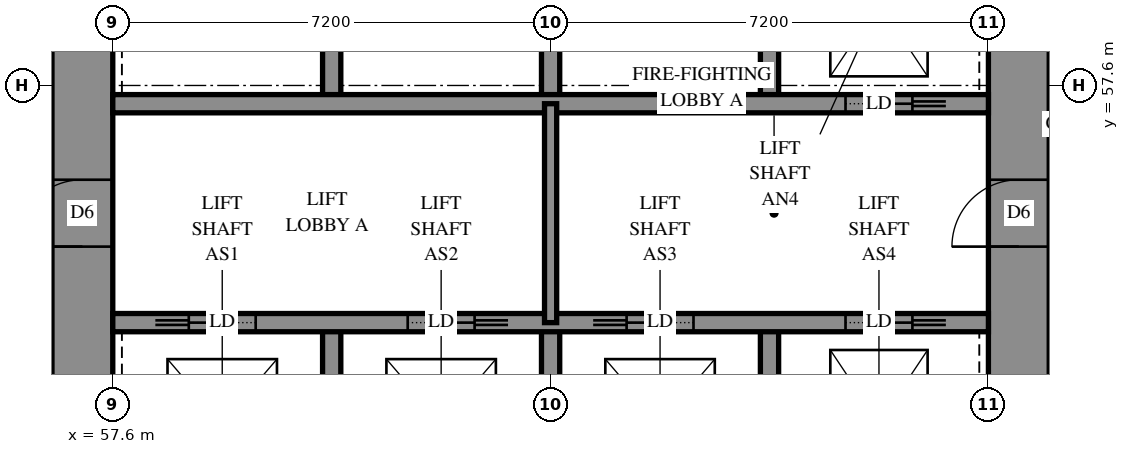
"""IFC4 building model, lengths in metres.
Left out: names, types, materials, properties, quantities, classifications, styles, units other than length and angle.
Written with IfcOpenShell. Run it as: python <this file> out.ifc"""

import sys

from ifc_helpers import new_model, si_unit, direction, frame, frame_2d, origin, place, context, subcontext, project, spatial, rectangle, extrude, element, fill, save


model = new_model("IFC4")
c1 = context("Model", 3, precision=1e-05, world=origin(), true_north=direction((0.0, 1.0)))
c2 = subcontext(c1, "Body", "Model", "MODEL_VIEW")
j1 = project(units=[si_unit("LENGTHUNIT", "METRE"), si_unit("PLANEANGLEUNIT", "RADIAN")], contexts=[c1])
p1 = place(None, origin())
s1 = spatial("IfcSite", under=j1, at=p1, CompositionType="ELEMENT")
p2 = place(p1, origin())
s2 = spatial("IfcBuilding", under=s1, at=p2, CompositionType="ELEMENT")
p3 = place(p2, frame((0.0, 0.0, 61.0)))
s3 = spatial("IfcBuildingStorey", under=s2, at=p3, CompositionType="ELEMENT", Elevation=61.0)
p4 = place(p3, frame((57.1, 50.4, -0.3), z_axis=(0.0, 0.0, 1.0), x_axis=(0.0, 1.0, 0.0)))
e1 = element("IfcWall", 1, at=p4, inside=s3, PredefinedType="SHEAR", context=c2, shape_type="SweptSolid", body=[
    extrude(rectangle(XDim=14.4, YDim=1.0, at=frame_2d((7.2, 0.0))), origin(), (0.0, 0.0, 1.0), 2.7),
])
p5 = place(p4, frame((4.55, 0.0, 0.3)))
e2 = element("IfcOpeningElement", 2, at=p5, cuts=e1, PredefinedType="OPENING", context=c2, shape_type="SweptSolid", body=[
    extrude(rectangle(XDim=1.1, YDim=2.1, at=frame_2d((0.55, 1.05))), frame((0.0, 0.51, 0.0), z_axis=(0.0, -1.0, 0.0), x_axis=(1.0, 0.0, 0.0)), (0.0, 0.0, 1.0), 1.02),
])
p6 = place(p4, frame((11.35, 0.0, 0.3)))
e3 = element("IfcOpeningElement", 3, at=p6, cuts=e1, PredefinedType="OPENING", context=c2, shape_type="SweptSolid", body=[
    extrude(rectangle(XDim=1.1, YDim=2.1, at=frame_2d((0.55, 1.05))), frame((0.0, 0.51, 0.0), z_axis=(0.0, -1.0, 0.0), x_axis=(1.0, 0.0, 0.0)), (0.0, 0.0, 1.0), 1.02),
])
p7 = place(p3, frame((72.5, 50.4, -0.3), z_axis=(0.0, 0.0, 1.0), x_axis=(0.0, 1.0, 0.0)))
e4 = element("IfcWall", 4, at=p7, inside=s3, PredefinedType="SHEAR", context=c2, shape_type="SweptSolid", body=[
    extrude(rectangle(XDim=14.4, YDim=1.0, at=frame_2d((7.2, 0.0))), origin(), (0.0, 0.0, 1.0), 2.7),
])
p8 = place(p7, frame((4.55, 0.0, 0.3)))
e5 = element("IfcOpeningElement", 5, at=p8, cuts=e4, PredefinedType="OPENING", context=c2, shape_type="SweptSolid", body=[
    extrude(rectangle(XDim=1.1, YDim=2.1, at=frame_2d((0.55, 1.05))), frame((0.0, 0.51, 0.0), z_axis=(0.0, -1.0, 0.0), x_axis=(1.0, 0.0, 0.0)), (0.0, 0.0, 1.0), 1.02),
])
p9 = place(p7, frame((11.35, 0.0, 0.3)))
e6 = element("IfcOpeningElement", 6, at=p9, cuts=e4, PredefinedType="OPENING", context=c2, shape_type="SweptSolid", body=[
    extrude(rectangle(XDim=1.1, YDim=2.1, at=frame_2d((0.55, 1.05))), frame((0.0, 0.51, 0.0), z_axis=(0.0, -1.0, 0.0), x_axis=(1.0, 0.0, 0.0)), (0.0, 0.0, 1.0), 1.02),
])
for number, where, z_axis, x_axis in (
    (7, (61.2, 50.4, 0.0), (0.0, 0.0, 1.0), (0.0, 1.0, 0.0)),
    (8, (61.2, 57.3, 0.0), (0.0, 0.0, 1.0), (0.0, 1.0, 0.0)),
    (9, (64.8, 50.4, 0.0), (0.0, 0.0, 1.0), (0.0, 1.0, 0.0)),
    (10, (64.8, 57.3, 0.0), (0.0, 0.0, 1.0), (0.0, 1.0, 0.0)),
    (11, (68.4, 50.4, 0.0), (0.0, 0.0, 1.0), (0.0, 1.0, 0.0)),
    (12, (68.4, 57.3, 0.0), (0.0, 0.0, 1.0), (0.0, 1.0, 0.0)),
):
    element("IfcWall", number, at=place(p3, frame(where, z_axis=z_axis, x_axis=x_axis)), inside=s3, PredefinedType="SOLIDWALL", context=c2, shape_type="SweptSolid", body=[
        extrude(rectangle(XDim=3.3, YDim=0.3, at=frame_2d((1.65, 0.0))), origin(), (0.0, 0.0, 1.0), 3.1),
    ])
p10 = place(p3, frame((57.6, 53.7, 0.0), z_axis=(0.0, 0.0, 1.0), x_axis=(1.0, 0.0, 0.0)))
e13 = element("IfcWall", 13, at=p10, inside=s3, PredefinedType="SOLIDWALL", context=c2, shape_type="SweptSolid", body=[
    extrude(rectangle(XDim=14.4, YDim=0.3, at=frame_2d((7.2, 0.0))), origin(), (0.0, 0.0, 1.0), 3.1),
])
p11 = place(p10, frame((1.25, 0.0, 0.0)))
e14 = element("IfcOpeningElement", 14, at=p11, cuts=e13, PredefinedType="OPENING", context=c2, shape_type="SweptSolid", body=[
    extrude(rectangle(XDim=1.1, YDim=2.1, at=frame_2d((0.55, 1.05))), frame((0.0, 0.16, 0.0), z_axis=(0.0, -1.0, 0.0), x_axis=(1.0, 0.0, 0.0)), (0.0, 0.0, 1.0), 0.32),
])
p12 = place(p10, frame((4.85, 0.0, 0.0)))
e15 = element("IfcOpeningElement", 15, at=p12, cuts=e13, PredefinedType="OPENING", context=c2, shape_type="SweptSolid", body=[
    extrude(rectangle(XDim=1.1, YDim=2.1, at=frame_2d((0.55, 1.05))), frame((0.0, 0.16, 0.0), z_axis=(0.0, -1.0, 0.0), x_axis=(1.0, 0.0, 0.0)), (0.0, 0.0, 1.0), 0.32),
])
p13 = place(p10, frame((8.45, 0.0, 0.0)))
e16 = element("IfcOpeningElement", 16, at=p13, cuts=e13, PredefinedType="OPENING", context=c2, shape_type="SweptSolid", body=[
    extrude(rectangle(XDim=1.1, YDim=2.1, at=frame_2d((0.55, 1.05))), frame((0.0, 0.16, 0.0), z_axis=(0.0, -1.0, 0.0), x_axis=(1.0, 0.0, 0.0)), (0.0, 0.0, 1.0), 0.32),
])
p14 = place(p10, frame((12.05, 0.0, 0.0)))
e17 = element("IfcOpeningElement", 17, at=p14, cuts=e13, PredefinedType="OPENING", context=c2, shape_type="SweptSolid", body=[
    extrude(rectangle(XDim=1.1, YDim=2.1, at=frame_2d((0.55, 1.05))), frame((0.0, 0.16, 0.0), z_axis=(0.0, -1.0, 0.0), x_axis=(1.0, 0.0, 0.0)), (0.0, 0.0, 1.0), 0.32),
])
p15 = place(p3, frame((57.6, 57.3, 0.0), z_axis=(0.0, 0.0, 1.0), x_axis=(1.0, 0.0, 0.0)))
e18 = element("IfcWall", 18, at=p15, inside=s3, PredefinedType="SOLIDWALL", context=c2, shape_type="SweptSolid", body=[
    extrude(rectangle(XDim=14.4, YDim=0.3, at=frame_2d((7.2, 0.0))), origin(), (0.0, 0.0, 1.0), 3.1),
])
p16 = place(p15, frame((12.05, 0.0, 0.0)))
e19 = element("IfcOpeningElement", 19, at=p16, cuts=e18, PredefinedType="OPENING", context=c2, shape_type="SweptSolid", body=[
    extrude(rectangle(XDim=1.1, YDim=2.1, at=frame_2d((0.55, 1.05))), frame((0.0, 0.16, 0.0), z_axis=(0.0, -1.0, 0.0), x_axis=(1.0, 0.0, 0.0)), (0.0, 0.0, 1.0), 0.32),
])
p17 = place(p3, frame((64.8, 53.7, 0.0), z_axis=(0.0, 0.0, 1.0), x_axis=(0.0, 1.0, 0.0)))
e20 = element("IfcWall", 20, at=p17, inside=s3, PredefinedType="PARTITIONING", context=c2, shape_type="SweptSolid", body=[
    extrude(rectangle(XDim=3.6, YDim=0.2, at=frame_2d((1.8, 0.0))), origin(), (0.0, 0.0, 1.0), 3.1),
])
p18 = place(p5, origin())
e21 = element("IfcDoor", 21, at=p18, inside=s3, OperationType="DOUBLE_DOOR_SINGLE_SWING", PredefinedType="DOOR", context=c2, shape_type="SweptSolid", body=[
    extrude(rectangle(XDim=1.1, YDim=2.1, at=frame_2d((0.55, 1.05))), frame((0.0, 0.025, 0.0), z_axis=(0.0, -1.0, 0.0), x_axis=(1.0, 0.0, 0.0)), (0.0, 0.0, 1.0), 0.05),
])
fill(e2, e21)
p19 = place(p8, origin())
e22 = element("IfcDoor", 22, at=p19, inside=s3, OperationType="DOUBLE_DOOR_SINGLE_SWING", PredefinedType="DOOR", context=c2, shape_type="SweptSolid", body=[
    extrude(rectangle(XDim=1.1, YDim=2.1, at=frame_2d((0.55, 1.05))), frame((0.0, 0.025, 0.0), z_axis=(0.0, -1.0, 0.0), x_axis=(1.0, 0.0, 0.0)), (0.0, 0.0, 1.0), 0.05),
])
fill(e5, e22)
p20 = place(p11, origin())
e23 = element("IfcDoor", 23, at=p20, inside=s3, OperationType="SLIDING_TO_LEFT", PredefinedType="DOOR", context=c2, shape_type="SweptSolid", body=[
    extrude(rectangle(XDim=1.1, YDim=2.1, at=frame_2d((0.55, 1.05))), frame((0.0, 0.025, 0.0), z_axis=(0.0, -1.0, 0.0), x_axis=(1.0, 0.0, 0.0)), (0.0, 0.0, 1.0), 0.05),
])
fill(e14, e23)
p21 = place(p12, origin())
e24 = element("IfcDoor", 24, at=p21, inside=s3, OperationType="SLIDING_TO_RIGHT", PredefinedType="DOOR", context=c2, shape_type="SweptSolid", body=[
    extrude(rectangle(XDim=1.1, YDim=2.1, at=frame_2d((0.55, 1.05))), frame((0.0, 0.025, 0.0), z_axis=(0.0, -1.0, 0.0), x_axis=(1.0, 0.0, 0.0)), (0.0, 0.0, 1.0), 0.05),
])
fill(e15, e24)
p22 = place(p13, origin())
e25 = element("IfcDoor", 25, at=p22, inside=s3, OperationType="SLIDING_TO_LEFT", PredefinedType="DOOR", context=c2, shape_type="SweptSolid", body=[
    extrude(rectangle(XDim=1.1, YDim=2.1, at=frame_2d((0.55, 1.05))), frame((0.0, 0.025, 0.0), z_axis=(0.0, -1.0, 0.0), x_axis=(1.0, 0.0, 0.0)), (0.0, 0.0, 1.0), 0.05),
])
fill(e16, e25)
p23 = place(p14, origin())
e26 = element("IfcDoor", 26, at=p23, inside=s3, OperationType="SLIDING_TO_RIGHT", PredefinedType="DOOR", context=c2, shape_type="SweptSolid", body=[
    extrude(rectangle(XDim=1.1, YDim=2.1, at=frame_2d((0.55, 1.05))), frame((0.0, 0.025, 0.0), z_axis=(0.0, -1.0, 0.0), x_axis=(1.0, 0.0, 0.0)), (0.0, 0.0, 1.0), 0.05),
])
fill(e17, e26)
p24 = place(p16, origin())
e27 = element("IfcDoor", 27, at=p24, inside=s3, OperationType="SLIDING_TO_RIGHT", PredefinedType="DOOR", context=c2, shape_type="SweptSolid", body=[
    extrude(rectangle(XDim=1.1, YDim=2.1, at=frame_2d((0.55, 1.05))), frame((0.0, 0.025, 0.0), z_axis=(0.0, -1.0, 0.0), x_axis=(1.0, 0.0, 0.0)), (0.0, 0.0, 1.0), 0.05),
])
fill(e19, e27)
save(model, sys.argv[1])
